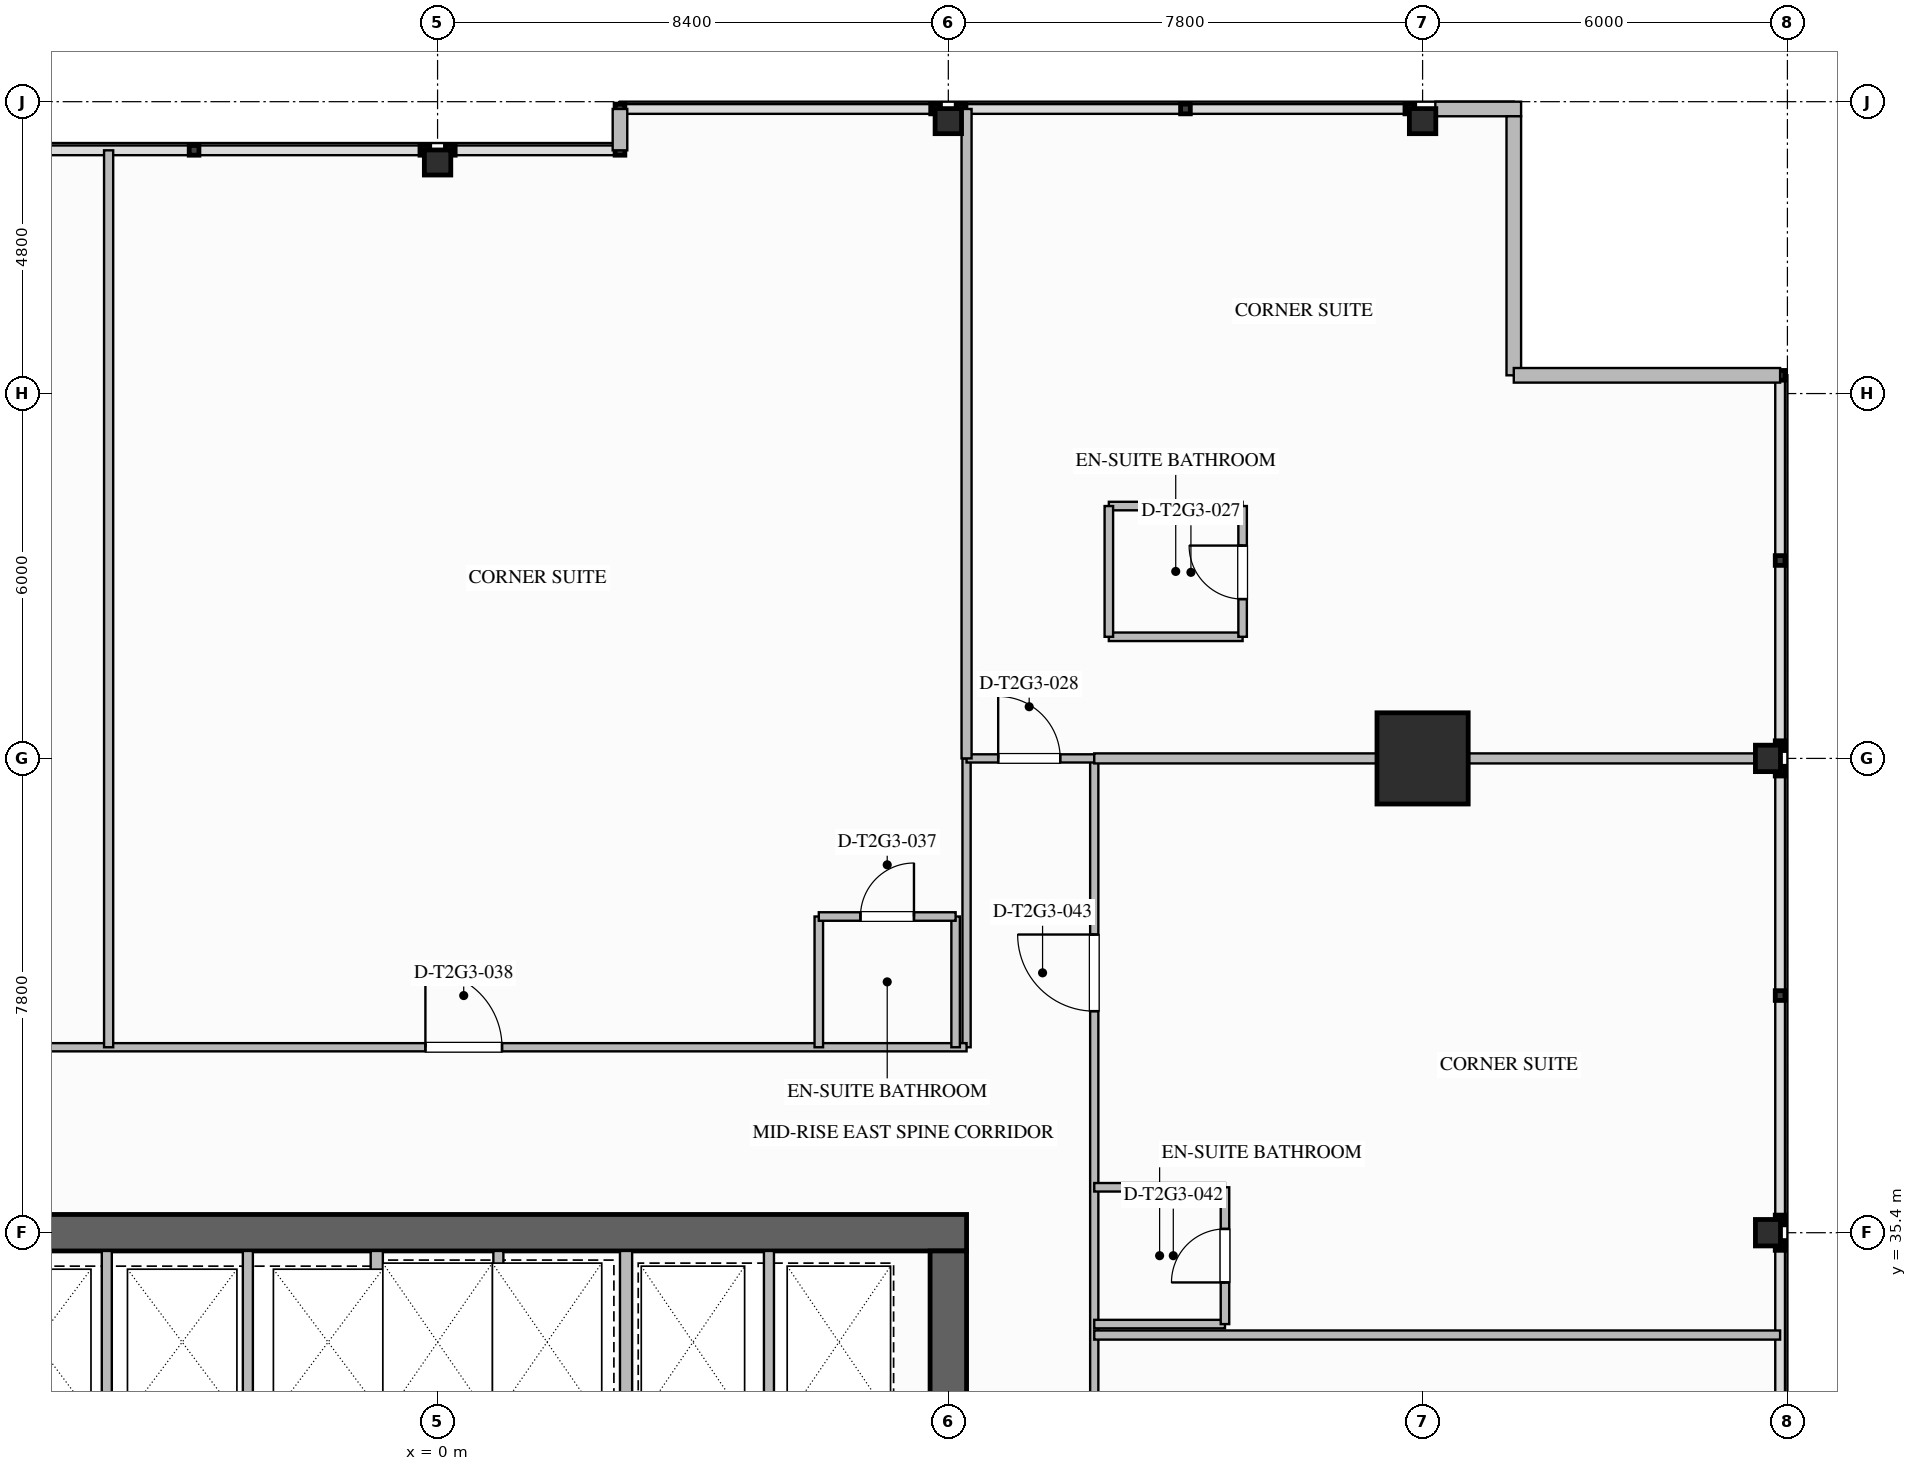
"""IFC4 building model, lengths in metres.
Left out: names, types, materials, properties, quantities, classifications, styles, units other than length and angle.
Written with IfcOpenShell. Run it as: python <this file> out.ifc"""

import sys

from ifc_helpers import new_model, si_unit, direction, frame, frame_2d, origin, origin_2d, place, context, subcontext, project, spatial, rectangle, i_section, extrude, element, fill, save


model = new_model("IFC4")
c1 = context("Model", 3, precision=1e-05, world=origin(), true_north=direction((0.0, 1.0)))
c2 = subcontext(c1, "Body", "Model", "MODEL_VIEW")
j1 = project(units=[si_unit("LENGTHUNIT", "METRE"), si_unit("PLANEANGLEUNIT", "RADIAN")], contexts=[c1])
p1 = place(None, origin())
s1 = spatial("IfcSite", under=j1, at=p1, CompositionType="ELEMENT")
p2 = place(p1, origin())
s2 = spatial("IfcBuilding", under=s1, at=p2, CompositionType="ELEMENT")
p3 = place(p2, frame((0.0, 0.0, 119.8)))
s3 = spatial("IfcBuildingStorey", under=s2, at=p3, CompositionType="ELEMENT", Elevation=119.8)
p4 = place(p3, frame((-8.7, 35.4, 0.0), z_axis=(0.0, 0.0, 1.0), x_axis=(1.0, 0.0, 0.0)))
e1 = element("IfcWall", 1, at=p4, inside=s3, PredefinedType="SHEAR", context=c2, shape_type="SweptSolid", body=[
    extrude(rectangle(XDim=17.4, YDim=0.6, at=frame_2d((8.7, 0.0))), origin(), (0.0, 0.0, 1.0), 3.5),
])
p5 = place(p3, frame((8.4, 35.1, 0.0), z_axis=(0.0, 0.0, 1.0), x_axis=(0.0, -1.0, 0.0)))
e2 = element("IfcWall", 2, at=p5, inside=s3, PredefinedType="SHEAR", context=c2, shape_type="SweptSolid", body=[
    extrude(rectangle(XDim=16.2, YDim=0.6, at=frame_2d((8.1, 0.0))), origin(), (0.0, 0.0, 1.0), 3.5),
])
p6 = place(p5, frame((3.08, 0.0, 0.0)))
e3 = element("IfcOpeningElement", 3, at=p6, cuts=e2, PredefinedType="OPENING", context=c2, shape_type="SweptSolid", body=[
    extrude(rectangle(XDim=1.12, YDim=2.1, at=frame_2d((0.56, 1.05))), frame((0.0, 0.31, 0.0), z_axis=(0.0, -1.0, 0.0), x_axis=(1.0, 0.0, 0.0)), (0.0, 0.0, 1.0), 0.62),
])
p7 = place(p5, frame((10.62, 0.0, 0.0)))
e4 = element("IfcOpeningElement", 4, at=p7, cuts=e2, PredefinedType="OPENING", context=c2, shape_type="SweptSolid", body=[
    extrude(rectangle(XDim=1.08, YDim=2.04, at=frame_2d((0.54, 1.02))), frame((0.0, 0.31, 0.0), z_axis=(0.0, -1.0, 0.0), x_axis=(1.0, 0.0, 0.0)), (0.0, 0.0, 1.0), 0.62),
])
p8 = place(p3, frame((16.2, 43.2, 0.0), z_axis=(0.0, 0.0, 1.0), x_axis=(1.0, 0.0, 0.0)))
e5 = element("IfcColumn", 5, at=p8, inside=s3, PredefinedType="COLUMN", context=c2, shape_type="SweptSolid", body=[
    extrude(rectangle(XDim=1.5, YDim=1.5, at=origin_2d()), origin(), (0.0, 0.0, 1.0), 3.5),
])
for number, where, z_axis, x_axis in (
    (6, (21.88, 35.4, 0.0), (0.0, 0.0, 1.0), (1.0, 0.0, 0.0)),
    (7, (21.88, 43.2, 0.0), (0.0, 0.0, 1.0), (1.0, 0.0, 0.0)),
    (8, (0.0, 53.0, 0.0), (0.0, 0.0, 1.0), (0.0, 1.0, 0.0)),
    (9, (8.4, 53.68, 0.0), (0.0, 0.0, 1.0), (0.0, 1.0, 0.0)),
    (10, (16.2, 53.68, 0.0), (0.0, 0.0, 1.0), (0.0, 1.0, 0.0)),
):
    element("IfcColumn", number, at=place(p3, frame(where, z_axis=z_axis, x_axis=x_axis)), inside=s3, PredefinedType="COLUMN", context=c2, shape_type="SweptSolid", body=[
        extrude(i_section(OverallWidth=0.412, OverallDepth=0.435, WebThickness=0.036, FlangeThickness=0.057, FilletRadius=0.028, at=origin_2d()), origin(), (0.0, 0.0, 1.0), 3.497),
    ])
p9 = place(p3, frame((16.409, 53.88, 0.0), z_axis=(0.0, 0.0, 1.0), x_axis=(1.0, 0.0, 0.0)))
e11 = element("IfcWall", 11, at=p9, inside=s3, PredefinedType="STANDARD", context=c2, shape_type="SweptSolid", body=[
    extrude(rectangle(XDim=1.411, YDim=0.24, at=frame_2d((0.705, 0.0))), origin(), (0.0, 0.0, 1.0), 3.24),
])
p10 = place(p3, frame((17.7, 53.76, 0.0), z_axis=(0.0, 0.0, 1.0), x_axis=(0.0, -1.0, 0.0)))
e12 = element("IfcWall", 12, at=p10, inside=s3, PredefinedType="STANDARD", context=c2, shape_type="SweptSolid", body=[
    extrude(rectangle(XDim=4.26, YDim=0.24, at=frame_2d((2.13, 0.0))), origin(), (0.0, 0.0, 1.0), 3.24),
])
p11 = place(p3, frame((17.7, 49.5, 0.0), z_axis=(0.0, 0.0, 1.0), x_axis=(1.0, 0.0, 0.0)))
e13 = element("IfcWall", 13, at=p11, inside=s3, PredefinedType="STANDARD", context=c2, shape_type="SweptSolid", body=[
    extrude(rectangle(XDim=4.38, YDim=0.24, at=frame_2d((2.19, 0.0))), origin(), (0.0, 0.0, 1.0), 3.24),
])
p12 = place(p3, frame((3.0, 53.2, 0.0), z_axis=(0.0, 0.0, 1.0), x_axis=(0.0, 1.0, 0.0)))
e14 = element("IfcWall", 14, at=p12, inside=s3, PredefinedType="STANDARD", context=c2, shape_type="SweptSolid", body=[
    extrude(rectangle(XDim=0.68, YDim=0.24, at=frame_2d((0.34, 0.0))), origin(), (0.0, 0.0, 1.0), 3.24),
])
p13 = place(p3, frame((3.1, 32.22, 0.0), z_axis=(0.0, 0.0, 1.0), x_axis=(0.0, 1.0, 0.0)))
e15 = element("IfcWall", 15, at=p13, inside=s3, PredefinedType="SOLIDWALL", context=c2, shape_type="SweptSolid", body=[
    extrude(rectangle(XDim=2.88, YDim=0.2, at=frame_2d((1.44, 0.0))), origin(), (0.0, 0.0, 1.0), 3.24),
])
p14 = place(p3, frame((5.45, 32.22, 0.0), z_axis=(0.0, 0.0, 1.0), x_axis=(0.0, 1.0, 0.0)))
e16 = element("IfcWall", 16, at=p14, inside=s3, PredefinedType="PARTITIONING", context=c2, shape_type="SweptSolid", body=[
    extrude(rectangle(XDim=2.88, YDim=0.165, at=frame_2d((1.44, 0.0))), origin(), (0.0, 0.0, 1.0), 3.24),
])
p15 = place(p3, frame((-1.0, 32.18, 0.0), z_axis=(0.0, 0.0, 1.0), x_axis=(0.0, 1.0, 0.0)))
e17 = element("IfcWall", 17, at=p15, inside=s3, PredefinedType="SOLIDWALL", context=c2, shape_type="SweptSolid", body=[
    extrude(rectangle(XDim=2.92, YDim=0.2, at=frame_2d((1.46, 0.0))), origin(), (0.0, 0.0, 1.0), 3.24),
])
p16 = place(p3, frame((1.0, 32.18, 0.0), z_axis=(0.0, 0.0, 1.0), x_axis=(0.0, 1.0, 0.0)))
e18 = element("IfcWall", 18, at=p16, inside=s3, PredefinedType="PARTITIONING", context=c2, shape_type="SweptSolid", body=[
    extrude(rectangle(XDim=2.92, YDim=0.165, at=frame_2d((1.46, 0.0))), origin(), (0.0, 0.0, 1.0), 3.24),
])
for number, where, z_axis, x_axis in (
    (19, (-5.44, 32.22, 0.0), (0.0, 0.0, 1.0), (0.0, 1.0, 0.0)),
    (20, (-3.12, 32.22, 0.0), (0.0, 0.0, 1.0), (0.0, 1.0, 0.0)),
):
    element("IfcWall", number, at=place(p3, frame(where, z_axis=z_axis, x_axis=x_axis)), inside=s3, PredefinedType="PARTITIONING", context=c2, shape_type="SweptSolid", body=[
        extrude(rectangle(XDim=2.88, YDim=0.165, at=frame_2d((1.44, 0.0))), origin(), (0.0, 0.0, 1.0), 3.24),
    ])
p17 = place(p3, frame((8.7, 38.45, 0.0), z_axis=(0.0, 0.0, 1.0), x_axis=(0.0, 1.0, 0.0)))
e21 = element("IfcWall", 21, at=p17, inside=s3, PredefinedType="PARTITIONING", context=c2, shape_type="SweptSolid", body=[
    extrude(rectangle(XDim=4.75, YDim=0.135, at=frame_2d((2.375, 0.0))), origin(), (0.0, 0.0, 1.0), 3.24),
])
p18 = place(p3, frame((-16.2, 38.45, 0.0), z_axis=(0.0, 0.0, 1.0), x_axis=(1.0, 0.0, 0.0)))
e22 = element("IfcWall", 22, at=p18, inside=s3, PredefinedType="PARTITIONING", context=c2, shape_type="SweptSolid", body=[
    extrude(rectangle(XDim=24.9, YDim=0.135, at=frame_2d((12.45, 0.0))), origin(), (0.0, 0.0, 1.0), 3.24),
])
p19 = place(p18, frame((5.98, 0.0, 0.0)))
e23 = element("IfcOpeningElement", 23, at=p19, cuts=e22, PredefinedType="OPENING", context=c2, shape_type="SweptSolid", body=[
    extrude(rectangle(XDim=1.26, YDim=2.2, at=frame_2d((0.63, 1.1))), frame((0.0, 0.077, 0.0), z_axis=(0.0, -1.0, 0.0), x_axis=(1.0, 0.0, 0.0)), (0.0, 0.0, 1.0), 0.155),
])
p20 = place(p18, frame((16.0, 0.0, 0.0)))
e24 = element("IfcOpeningElement", 24, at=p20, cuts=e22, PredefinedType="OPENING", context=c2, shape_type="SweptSolid", body=[
    extrude(rectangle(XDim=1.26, YDim=2.2, at=frame_2d((0.63, 1.1))), frame((0.0, 0.077, 0.0), z_axis=(0.0, -1.0, 0.0), x_axis=(1.0, 0.0, 0.0)), (0.0, 0.0, 1.0), 0.155),
])
p21 = place(p3, frame((10.8, 10.8, 0.0), z_axis=(0.0, 0.0, 1.0), x_axis=(0.0, 1.0, 0.0)))
e25 = element("IfcWall", 25, at=p21, inside=s3, PredefinedType="PARTITIONING", context=c2, shape_type="SweptSolid", body=[
    extrude(rectangle(XDim=32.4, YDim=0.135, at=frame_2d((16.2, 0.0))), origin(), (0.0, 0.0, 1.0), 3.24),
])
p22 = place(p21, frame((5.722, 0.0, 0.0)))
e26 = element("IfcOpeningElement", 26, at=p22, cuts=e25, PredefinedType="OPENING", context=c2, shape_type="SweptSolid", body=[
    extrude(rectangle(XDim=1.26, YDim=2.2, at=frame_2d((0.63, 1.1))), frame((0.0, 0.077, 0.0), z_axis=(0.0, -1.0, 0.0), x_axis=(1.0, 0.0, 0.0)), (0.0, 0.0, 1.0), 0.155),
])
p23 = place(p21, frame((16.085, 0.0, 0.0)))
e27 = element("IfcOpeningElement", 27, at=p23, cuts=e25, PredefinedType="OPENING", context=c2, shape_type="SweptSolid", body=[
    extrude(rectangle(XDim=1.02, YDim=2.15, at=frame_2d((0.51, 1.075))), frame((0.0, 0.077, 0.0), z_axis=(0.0, -1.0, 0.0), x_axis=(1.0, 0.0, 0.0)), (0.0, 0.0, 1.0), 0.155),
])
p24 = place(p21, frame((28.244, 0.0, 0.0)))
e28 = element("IfcOpeningElement", 28, at=p24, cuts=e25, PredefinedType="OPENING", context=c2, shape_type="SweptSolid", body=[
    extrude(rectangle(XDim=1.26, YDim=2.2, at=frame_2d((0.63, 1.1))), frame((0.0, 0.077, 0.0), z_axis=(0.0, -1.0, 0.0), x_axis=(1.0, 0.0, 0.0)), (0.0, 0.0, 1.0), 0.155),
])
p25 = place(p3, frame((8.7, 43.2, 0.0), z_axis=(0.0, 0.0, 1.0), x_axis=(1.0, 0.0, 0.0)))
e29 = element("IfcWall", 29, at=p25, inside=s3, PredefinedType="PARTITIONING", context=c2, shape_type="SweptSolid", body=[
    extrude(rectangle(XDim=2.1, YDim=0.135, at=frame_2d((1.05, 0.0))), origin(), (0.0, 0.0, 1.0), 2.53),
])
p26 = place(p25, frame((0.52, 0.0, 0.0)))
e30 = element("IfcOpeningElement", 30, at=p26, cuts=e29, PredefinedType="OPENING", context=c2, shape_type="SweptSolid", body=[
    extrude(rectangle(XDim=1.02, YDim=2.15, at=frame_2d((0.51, 1.075))), frame((0.0, 0.077, 0.0), z_axis=(0.0, -1.0, 0.0), x_axis=(1.0, 0.0, 0.0)), (0.0, 0.0, 1.0), 0.155),
])
p27 = place(p3, frame((8.7, 43.2, 0.0), z_axis=(0.0, 0.0, 1.0), x_axis=(0.0, 1.0, 0.0)))
e31 = element("IfcWall", 31, at=p27, inside=s3, PredefinedType="PARTITIONING", context=c2, shape_type="SweptSolid", body=[
    extrude(rectangle(XDim=10.68, YDim=0.165, at=frame_2d((5.34, 0.0))), origin(), (0.0, 0.0, 1.0), 2.53),
])
p28 = place(p3, frame((10.8, 43.2, 0.0), z_axis=(0.0, 0.0, 1.0), x_axis=(1.0, 0.0, 0.0)))
e32 = element("IfcWall", 32, at=p28, inside=s3, PredefinedType="PARTITIONING", context=c2, shape_type="SweptSolid", body=[
    extrude(rectangle(XDim=11.28, YDim=0.165, at=frame_2d((5.64, 0.0))), origin(), (0.0, 0.0, 1.0), 2.53),
])
for number, where, z_axis, x_axis in (
    (33, (11.04, 45.2, 0.0), (0.0, 0.0, 1.0), (1.0, 0.0, 0.0)),
    (34, (11.04, 47.35, 0.0), (0.0, 0.0, 1.0), (1.0, 0.0, 0.0)),
):
    element("IfcWall", number, at=place(p3, frame(where, z_axis=z_axis, x_axis=x_axis)), inside=s3, PredefinedType="PLUMBINGWALL", context=c2, shape_type="SweptSolid", body=[
        extrude(rectangle(XDim=2.2, YDim=0.14, at=frame_2d((1.1, 0.0))), origin(), (0.0, 0.0, 1.0), 3.24),
    ])
p29 = place(p3, frame((11.04, 45.2, 0.0), z_axis=(0.0, 0.0, 1.0), x_axis=(0.0, 1.0, 0.0)))
e35 = element("IfcWall", 35, at=p29, inside=s3, PredefinedType="PLUMBINGWALL", context=c2, shape_type="SweptSolid", body=[
    extrude(rectangle(XDim=2.15, YDim=0.14, at=frame_2d((1.075, 0.0))), origin(), (0.0, 0.0, 1.0), 3.24),
])
p30 = place(p3, frame((13.24, 45.2, 0.0), z_axis=(0.0, 0.0, 1.0), x_axis=(0.0, 1.0, 0.0)))
e36 = element("IfcWall", 36, at=p30, inside=s3, PredefinedType="PLUMBINGWALL", context=c2, shape_type="SweptSolid", body=[
    extrude(rectangle(XDim=2.15, YDim=0.14, at=frame_2d((1.075, 0.0))), origin(), (0.0, 0.0, 1.0), 3.24),
])
p31 = place(p30, frame((0.62, 0.0, 0.0)))
e37 = element("IfcOpeningElement", 37, at=p31, cuts=e36, PredefinedType="OPENING", context=c2, shape_type="SweptSolid", body=[
    extrude(rectangle(XDim=0.88, YDim=2.1, at=frame_2d((0.44, 1.05))), frame((0.0, 0.08, 0.0), z_axis=(0.0, -1.0, 0.0), x_axis=(1.0, 0.0, 0.0)), (0.0, 0.0, 1.0), 0.16),
])
p32 = place(p3, frame((-5.41, 38.45, 0.0), z_axis=(0.0, 0.0, 1.0), x_axis=(0.0, 1.0, 0.0)))
e38 = element("IfcWall", 38, at=p32, inside=s3, PredefinedType="PARTITIONING", context=c2, shape_type="SweptSolid", body=[
    extrude(rectangle(XDim=14.75, YDim=0.15, at=frame_2d((7.375, 0.0))), origin(), (0.0, 0.0, 1.0), 3.24),
])
p33 = place(p3, frame((6.27, 38.45, 0.0), z_axis=(0.0, 0.0, 1.0), x_axis=(0.0, 1.0, 0.0)))
e39 = element("IfcWall", 39, at=p33, inside=s3, PredefinedType="PLUMBINGWALL", context=c2, shape_type="SweptSolid", body=[
    extrude(rectangle(XDim=2.15, YDim=0.14, at=frame_2d((1.075, 0.0))), origin(), (0.0, 0.0, 1.0), 3.24),
])
p34 = place(p3, frame((8.52, 38.45, 0.0), z_axis=(0.0, 0.0, 1.0), x_axis=(0.0, 1.0, 0.0)))
e40 = element("IfcWall", 40, at=p34, inside=s3, PredefinedType="PLUMBINGWALL", context=c2, shape_type="SweptSolid", body=[
    extrude(rectangle(XDim=2.15, YDim=0.14, at=frame_2d((1.075, 0.0))), origin(), (0.0, 0.0, 1.0), 2.617),
])
p35 = place(p3, frame((6.27, 40.6, 0.0), z_axis=(0.0, 0.0, 1.0), x_axis=(1.0, 0.0, 0.0)))
e41 = element("IfcWall", 41, at=p35, inside=s3, PredefinedType="PLUMBINGWALL", context=c2, shape_type="SweptSolid", body=[
    extrude(rectangle(XDim=2.25, YDim=0.14, at=frame_2d((1.125, 0.0))), origin(), (0.0, 0.0, 1.0), 3.24),
])
p36 = place(p35, frame((0.685, 0.0, 0.0)))
e42 = element("IfcOpeningElement", 42, at=p36, cuts=e41, PredefinedType="OPENING", context=c2, shape_type="SweptSolid", body=[
    extrude(rectangle(XDim=0.88, YDim=2.1, at=frame_2d((0.44, 1.05))), frame((0.0, 0.08, 0.0), z_axis=(0.0, -1.0, 0.0), x_axis=(1.0, 0.0, 0.0)), (0.0, 0.0, 1.0), 0.16),
])
p37 = place(p3, frame((10.8, 33.717, 0.0), z_axis=(0.0, 0.0, 1.0), x_axis=(1.0, 0.0, 0.0)))
e43 = element("IfcWall", 43, at=p37, inside=s3, PredefinedType="PARTITIONING", context=c2, shape_type="SweptSolid", body=[
    extrude(rectangle(XDim=11.28, YDim=0.15, at=frame_2d((5.64, 0.0))), origin(), (0.0, 0.0, 1.0), 3.24),
])
for number, where, z_axis, x_axis in (
    (44, (10.8, 33.897, 0.0), (0.0, 0.0, 1.0), (1.0, 0.0, 0.0)),
    (45, (10.8, 36.147, 0.0), (0.0, 0.0, 1.0), (1.0, 0.0, 0.0)),
):
    element("IfcWall", number, at=place(p3, frame(where, z_axis=z_axis, x_axis=x_axis)), inside=s3, PredefinedType="PLUMBINGWALL", context=c2, shape_type="SweptSolid", body=[
        extrude(rectangle(XDim=2.15, YDim=0.14, at=frame_2d((1.075, 0.0))), origin(), (0.0, 0.0, 1.0), 3.24),
    ])
p38 = place(p3, frame((12.95, 33.897, 0.0), z_axis=(0.0, 0.0, 1.0), x_axis=(0.0, 1.0, 0.0)))
e46 = element("IfcWall", 46, at=p38, inside=s3, PredefinedType="PLUMBINGWALL", context=c2, shape_type="SweptSolid", body=[
    extrude(rectangle(XDim=2.25, YDim=0.14, at=frame_2d((1.125, 0.0))), origin(), (0.0, 0.0, 1.0), 3.24),
])
p39 = place(p38, frame((0.685, 0.0, 0.0)))
e47 = element("IfcOpeningElement", 47, at=p39, cuts=e46, PredefinedType="OPENING", context=c2, shape_type="SweptSolid", body=[
    extrude(rectangle(XDim=0.88, YDim=2.1, at=frame_2d((0.44, 1.05))), frame((0.0, 0.08, 0.0), z_axis=(0.0, -1.0, 0.0), x_axis=(1.0, 0.0, 0.0)), (0.0, 0.0, 1.0), 0.16),
])
p40 = place(p31, origin())
e48 = element("IfcDoor", 48, at=p40, inside=s3, OperationType="SINGLE_SWING_RIGHT", PredefinedType="DOOR", context=c2, shape_type="SweptSolid", body=[
    extrude(rectangle(XDim=0.88, YDim=2.1, at=frame_2d((0.44, 1.05))), frame((0.0, 0.025, 0.0), z_axis=(0.0, -1.0, 0.0), x_axis=(1.0, 0.0, 0.0)), (0.0, 0.0, 1.0), 0.05),
])
fill(e37, e48)
p41 = place(p26, origin())
e49 = element("IfcDoor", 49, at=p41, inside=s3, OperationType="SINGLE_SWING_LEFT", PredefinedType="DOOR", context=c2, shape_type="SweptSolid", body=[
    extrude(rectangle(XDim=1.02, YDim=2.15, at=frame_2d((0.51, 1.075))), frame((0.0, 0.025, 0.0), z_axis=(0.0, -1.0, 0.0), x_axis=(1.0, 0.0, 0.0)), (0.0, 0.0, 1.0), 0.05),
])
fill(e30, e49)
p42 = place(p36, origin())
e50 = element("IfcDoor", 50, at=p42, inside=s3, OperationType="SINGLE_SWING_RIGHT", PredefinedType="DOOR", context=c2, shape_type="SweptSolid", body=[
    extrude(rectangle(XDim=0.88, YDim=2.1, at=frame_2d((0.44, 1.05))), frame((0.0, 0.025, 0.0), z_axis=(0.0, -1.0, 0.0), x_axis=(1.0, 0.0, 0.0)), (0.0, 0.0, 1.0), 0.05),
])
fill(e42, e50)
p43 = place(p20, origin())
e51 = element("IfcDoor", 51, at=p43, inside=s3, OperationType="SINGLE_SWING_LEFT", PredefinedType="DOOR", context=c2, shape_type="SweptSolid", body=[
    extrude(rectangle(XDim=1.26, YDim=2.2, at=frame_2d((0.63, 1.1))), frame((0.0, 0.025, 0.0), z_axis=(0.0, -1.0, 0.0), x_axis=(1.0, 0.0, 0.0)), (0.0, 0.0, 1.0), 0.05),
])
fill(e24, e51)
p44 = place(p39, origin())
e52 = element("IfcDoor", 52, at=p44, inside=s3, OperationType="SINGLE_SWING_LEFT", PredefinedType="DOOR", context=c2, shape_type="SweptSolid", body=[
    extrude(rectangle(XDim=0.88, YDim=2.1, at=frame_2d((0.44, 1.05))), frame((0.0, 0.025, 0.0), z_axis=(0.0, -1.0, 0.0), x_axis=(1.0, 0.0, 0.0)), (0.0, 0.0, 1.0), 0.05),
])
fill(e47, e52)
p45 = place(p24, origin())
e53 = element("IfcDoor", 53, at=p45, inside=s3, OperationType="SINGLE_SWING_RIGHT", PredefinedType="DOOR", context=c2, shape_type="SweptSolid", body=[
    extrude(rectangle(XDim=1.26, YDim=2.2, at=frame_2d((0.63, 1.1))), frame((0.0, 0.025, 0.0), z_axis=(0.0, -1.0, 0.0), x_axis=(1.0, 0.0, 0.0)), (0.0, 0.0, 1.0), 0.05),
])
fill(e28, e53)
save(model, sys.argv[1])
